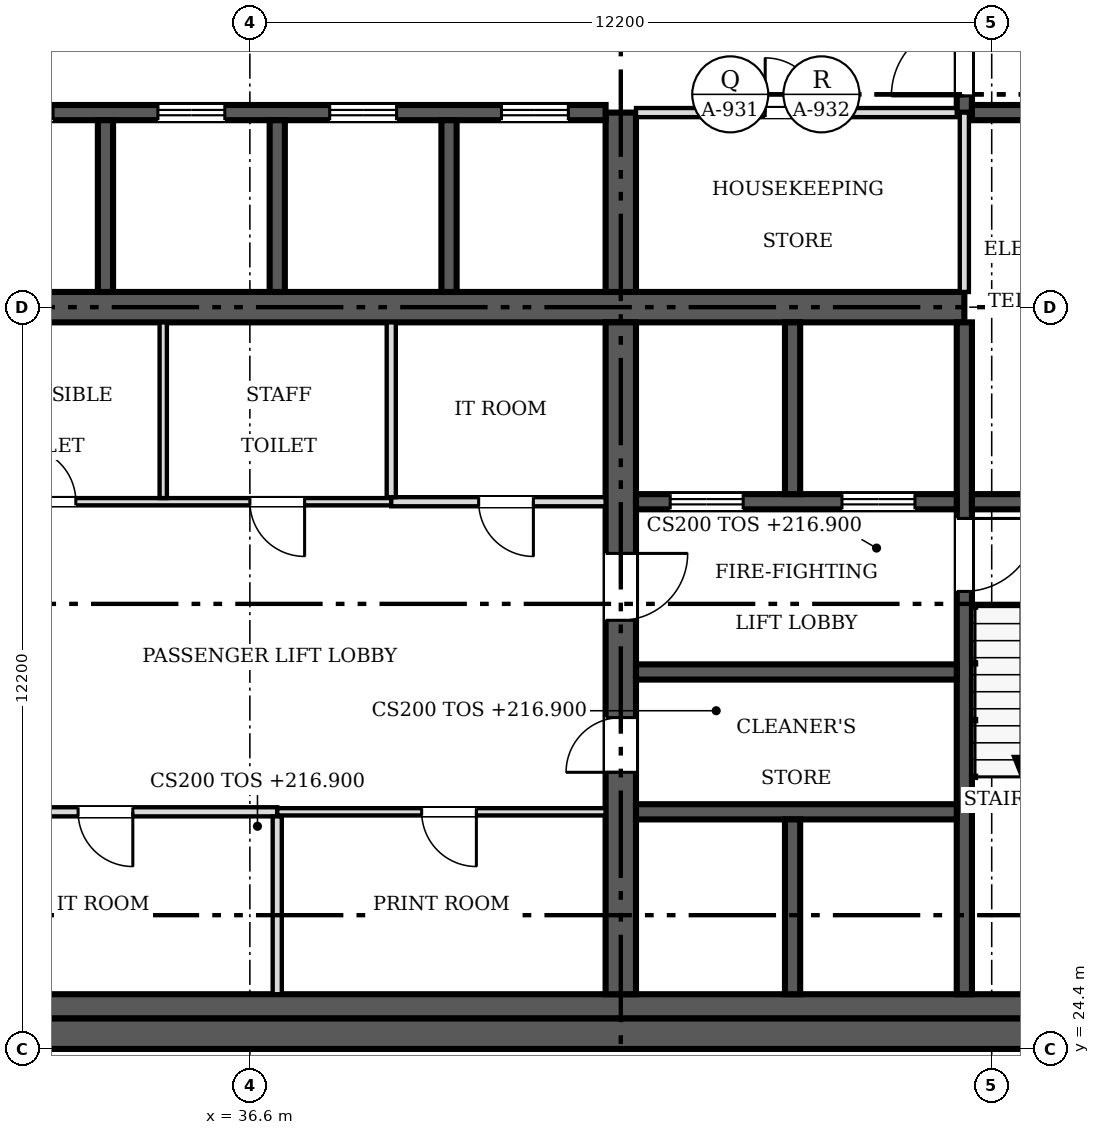
"""IFC4 building model, lengths in metres.
Left out: names, types, materials, properties, quantities, classifications, styles, units other than length and angle.
Written with IfcOpenShell. Run it as: python <this file> out.ifc"""

import sys

from ifc_helpers import new_model, si_unit, direction, frame, frame_2d, origin, place, context, subcontext, project, spatial, rectangle, extrude, source, transform, mapped, element, fill, save


model = new_model("IFC4")
c1 = context("Model", 3, precision=1e-05, world=origin(), true_north=direction((0.0, 1.0)))
c2 = subcontext(c1, "Body", "Model", "MODEL_VIEW")
j1 = project(units=[si_unit("LENGTHUNIT", "METRE"), si_unit("PLANEANGLEUNIT", "RADIAN")], contexts=[c1])
p1 = place(None, origin())
s1 = spatial("IfcSite", under=j1, at=p1, CompositionType="ELEMENT")
p2 = place(p1, origin())
s2 = spatial("IfcBuilding", under=s1, at=p2, CompositionType="ELEMENT")
p3 = place(p2, frame((0.0, 0.0, 216.9)))
s3 = spatial("IfcBuildingStorey", under=s2, at=p3, CompositionType="ELEMENT", Elevation=216.9)
p4 = place(p3, frame((54.9, 24.65, 0.0), z_axis=(0.0, 0.0, 1.0), x_axis=(-1.0, 0.0, 0.0)))
e1 = element("IfcWall", 1, at=p4, inside=s3, PredefinedType="SHEAR", context=c2, shape_type="SweptSolid", body=[
    extrude(rectangle(XDim=24.4, YDim=0.5, at=frame_2d((12.2, 0.0))), origin(), (0.0, 0.0, 1.0), 3.8),
])
m1 = source(origin(), c2, "Body", "SweptSolid", [
    extrude(rectangle(XDim=1.2, YDim=2.1, at=frame_2d((0.6, 1.05))), frame((0.0, 0.26, 0.0), z_axis=(0.0, -1.0, 0.0), x_axis=(1.0, 0.0, 0.0)), (0.0, 0.0, 1.0), 0.52),
])
p5 = place(p4, frame((1.5, 0.0, 0.0)))
e2 = element("IfcOpeningElement", 2, at=p5, cuts=e1, PredefinedType="OPENING", context=c2, shape_type="MappedRepresentation", body=[
    mapped(m1, transform((0.0, 0.0, 0.0), scale=1.0)),
])
p6 = place(p3, frame((31.0, 25.1, 0.0), z_axis=(0.0, 0.0, 1.0), x_axis=(1.0, 0.0, 0.0)))
e3 = element("IfcWall", 3, at=p6, inside=s3, PredefinedType="SOLIDWALL", context=c2, shape_type="SweptSolid", body=[
    extrude(rectangle(XDim=21.2, YDim=0.4, at=frame_2d((10.6, 0.0))), origin(), (0.0, 0.0, 1.0), 3.8),
])
p7 = place(p3, frame((31.4, 36.6, 0.0), z_axis=(0.0, 0.0, 1.0), x_axis=(1.0, 0.0, 0.0)))
e4 = element("IfcWall", 4, at=p7, inside=s3, PredefinedType="SHEAR", context=c2, shape_type="SweptSolid", body=[
    extrude(rectangle(XDim=16.95, YDim=0.5, at=frame_2d((8.475, 0.0))), origin(), (0.0, 0.0, 1.0), 3.8),
])
p8 = place(p3, frame((42.7, 36.35, 0.0), z_axis=(0.0, 0.0, 1.0), x_axis=(0.0, -1.0, 0.0)))
e5 = element("IfcWall", 5, at=p8, inside=s3, PredefinedType="SHEAR", context=c2, shape_type="SweptSolid", body=[
    extrude(rectangle(XDim=11.05, YDim=0.5, at=frame_2d((5.525, 0.0))), origin(), (0.0, 0.0, 1.0), 3.8),
])
m2 = source(origin(), c2, "Body", "SweptSolid", [
    extrude(rectangle(XDim=0.9, YDim=2.1, at=frame_2d((0.45, 1.05))), frame((0.0, 0.26, 0.0), z_axis=(0.0, -1.0, 0.0), x_axis=(1.0, 0.0, 0.0)), (0.0, 0.0, 1.0), 0.52),
])
p9 = place(p8, frame((6.5, 0.0, 0.0)))
e6 = element("IfcOpeningElement", 6, at=p9, cuts=e5, PredefinedType="OPENING", context=c2, shape_type="MappedRepresentation", body=[
    mapped(m2, transform((0.0, 0.0, 0.0), scale=1.0)),
])
m3 = source(origin(), c2, "Body", "SweptSolid", [
    extrude(rectangle(XDim=1.1, YDim=2.1, at=frame_2d((0.55, 1.05))), frame((0.0, 0.26, 0.0), z_axis=(0.0, -1.0, 0.0), x_axis=(1.0, 0.0, 0.0)), (0.0, 0.0, 1.0), 0.52),
])
p10 = place(p8, frame((3.8, 0.0, 0.0)))
e7 = element("IfcOpeningElement", 7, at=p10, cuts=e5, PredefinedType="OPENING", context=c2, shape_type="MappedRepresentation", body=[
    mapped(m3, transform((0.0, 0.0, 0.0), scale=1.0)),
])
p11 = place(p3, frame((42.7, 36.85, 0.0), z_axis=(0.0, 0.0, 1.0), x_axis=(0.0, 1.0, 0.0)))
e8 = element("IfcWall", 8, at=p11, inside=s3, PredefinedType="SHEAR", context=c2, shape_type="SweptSolid", body=[
    extrude(rectangle(XDim=2.95, YDim=0.5, at=frame_2d((1.475, 0.0))), origin(), (0.0, 0.0, 1.0), 3.8),
])
p12 = place(p3, frame((31.4, 39.8, 0.0), z_axis=(0.0, 0.0, 1.0), x_axis=(1.0, 0.0, 0.0)))
e9 = element("IfcWall", 9, at=p12, inside=s3, PredefinedType="SOLIDWALL", context=c2, shape_type="SweptSolid", body=[
    extrude(rectangle(XDim=11.05, YDim=0.25, at=frame_2d((5.525, 0.0))), origin(), (0.0, 0.0, 1.0), 3.8),
])
m4 = source(origin(), c2, "Body", "SweptSolid", [
    extrude(rectangle(XDim=1.1, YDim=2.1, at=frame_2d((0.55, 1.05))), frame((0.0, 0.135, 0.0), z_axis=(0.0, -1.0, 0.0), x_axis=(1.0, 0.0, 0.0)), (0.0, 0.0, 1.0), 0.27),
])
p13 = place(p12, frame((0.863, 0.0, 0.0)))
e10 = element("IfcOpeningElement", 10, at=p13, cuts=e9, PredefinedType="OPENING", context=c2, shape_type="MappedRepresentation", body=[
    mapped(m4, transform((0.0, 0.0, 0.0), scale=1.0)),
])
p14 = place(p12, frame((3.688, 0.0, 0.0)))
e11 = element("IfcOpeningElement", 11, at=p14, cuts=e9, PredefinedType="OPENING", context=c2, shape_type="MappedRepresentation", body=[
    mapped(m4, transform((0.0, 0.0, 0.0), scale=1.0)),
])
p15 = place(p12, frame((6.512, 0.0, 0.0)))
e12 = element("IfcOpeningElement", 12, at=p15, cuts=e9, PredefinedType="OPENING", context=c2, shape_type="MappedRepresentation", body=[
    mapped(m4, transform((0.0, 0.0, 0.0), scale=1.0)),
])
p16 = place(p12, frame((9.337, 0.0, 0.0)))
e13 = element("IfcOpeningElement", 13, at=p16, cuts=e9, PredefinedType="OPENING", context=c2, shape_type="MappedRepresentation", body=[
    mapped(m4, transform((0.0, 0.0, 0.0), scale=1.0)),
])
p17 = place(p3, frame((48.35, 36.35, 0.0), z_axis=(0.0, 0.0, 1.0), x_axis=(0.0, -1.0, 0.0)))
e14 = element("IfcWall", 14, at=p17, inside=s3, PredefinedType="SOLIDWALL", context=c2, shape_type="SweptSolid", body=[
    extrude(rectangle(XDim=11.05, YDim=0.25, at=frame_2d((5.525, 0.0))), origin(), (0.0, 0.0, 1.0), 3.8),
])
m5 = source(origin(), c2, "Body", "SweptSolid", [
    extrude(rectangle(XDim=1.2, YDim=2.1, at=frame_2d((0.6, 1.05))), frame((0.0, 0.135, 0.0), z_axis=(0.0, -1.0, 0.0), x_axis=(1.0, 0.0, 0.0)), (0.0, 0.0, 1.0), 0.27),
])
p18 = place(p17, frame((3.225, 0.0, 0.0)))
e15 = element("IfcOpeningElement", 15, at=p18, cuts=e14, PredefinedType="OPENING", context=c2, shape_type="MappedRepresentation", body=[
    mapped(m5, transform((0.0, 0.0, 0.0), scale=1.0)),
])
p19 = place(p3, frame((48.225, 33.4, 0.0), z_axis=(0.0, 0.0, 1.0), x_axis=(-1.0, 0.0, 0.0)))
e16 = element("IfcWall", 16, at=p19, inside=s3, PredefinedType="SOLIDWALL", context=c2, shape_type="SweptSolid", body=[
    extrude(rectangle(XDim=5.275, YDim=0.25, at=frame_2d((2.638, 0.0))), origin(), (0.0, 0.0, 1.0), 3.8),
])
p20 = place(p19, frame((3.512, 0.0, 0.0)))
e17 = element("IfcOpeningElement", 17, at=p20, cuts=e16, PredefinedType="OPENING", context=c2, shape_type="MappedRepresentation", body=[
    mapped(m5, transform((0.0, 0.0, 0.0), scale=1.0)),
])
p21 = place(p19, frame((0.688, 0.0, 0.0)))
e18 = element("IfcOpeningElement", 18, at=p21, cuts=e16, PredefinedType="OPENING", context=c2, shape_type="MappedRepresentation", body=[
    mapped(m5, transform((0.0, 0.0, 0.0), scale=1.0)),
])
p22 = place(p3, frame((48.475, 33.4, 0.0), z_axis=(0.0, 0.0, 1.0), x_axis=(1.0, 0.0, 0.0)))
e19 = element("IfcWall", 19, at=p22, inside=s3, PredefinedType="SOLIDWALL", context=c2, shape_type="SweptSolid", body=[
    extrude(rectangle(XDim=3.525, YDim=0.25, at=frame_2d((1.762, 0.0))), origin(), (0.0, 0.0, 1.0), 3.8),
])
p23 = place(p3, frame((48.35, 47.9, 0.0), z_axis=(0.0, 0.0, 1.0), x_axis=(0.0, -1.0, 0.0)))
e20 = element("IfcWall", 20, at=p23, inside=s3, PredefinedType="SOLIDWALL", context=c2, shape_type="SweptSolid", body=[
    extrude(rectangle(XDim=8.1, YDim=0.25, at=frame_2d((4.05, 0.0))), origin(), (0.0, 0.0, 1.0), 3.8),
])
p24 = place(p23, frame((6.625, 0.0, 0.0)))
e21 = element("IfcOpeningElement", 21, at=p24, cuts=e20, PredefinedType="OPENING", context=c2, shape_type="MappedRepresentation", body=[
    mapped(m5, transform((0.0, 0.0, 0.0), scale=1.0)),
])
for number, where, z_axis, x_axis in (
    (22, (42.95, 28.3, 0.0), (0.0, 0.0, 1.0), (1.0, 0.0, 0.0)),
    (23, (42.95, 30.6, 0.0), (0.0, 0.0, 1.0), (1.0, 0.0, 0.0)),
):
    element("IfcWall", number, at=place(p3, frame(where, z_axis=z_axis, x_axis=x_axis)), inside=s3, PredefinedType="SOLIDWALL", context=c2, shape_type="SweptSolid", body=[
        extrude(rectangle(XDim=5.275, YDim=0.25, at=frame_2d((2.638, 0.0))), origin(), (0.0, 0.0, 1.0), 3.8),
    ])
p25 = place(p3, frame((48.475, 39.8, 0.0), z_axis=(0.0, 0.0, 1.0), x_axis=(1.0, 0.0, 0.0)))
e24 = element("IfcWall", 24, at=p25, inside=s3, PredefinedType="SOLIDWALL", context=c2, shape_type="SweptSolid", body=[
    extrude(rectangle(XDim=3.4, YDim=0.25, at=frame_2d((1.7, 0.0))), origin(), (0.0, 0.0, 1.0), 3.8),
])
for number, where, z_axis, x_axis in (
    (25, (34.225, 36.85, 0.0), (0.0, 0.0, 1.0), (0.0, 1.0, 0.0)),
    (26, (37.05, 36.85, 0.0), (0.0, 0.0, 1.0), (0.0, 1.0, 0.0)),
    (27, (39.875, 36.85, 0.0), (0.0, 0.0, 1.0), (0.0, 1.0, 0.0)),
):
    element("IfcWall", number, at=place(p3, frame(where, z_axis=z_axis, x_axis=x_axis)), inside=s3, PredefinedType="SOLIDWALL", context=c2, shape_type="SweptSolid", body=[
        extrude(rectangle(XDim=2.825, YDim=0.25, at=frame_2d((1.413, 0.0))), origin(), (0.0, 0.0, 1.0), 3.8),
    ])
p26 = place(p3, frame((45.525, 33.525, 0.0), z_axis=(0.0, 0.0, 1.0), x_axis=(0.0, 1.0, 0.0)))
e28 = element("IfcWall", 28, at=p26, inside=s3, PredefinedType="SOLIDWALL", context=c2, shape_type="SweptSolid", body=[
    extrude(rectangle(XDim=2.825, YDim=0.25, at=frame_2d((1.413, 0.0))), origin(), (0.0, 0.0, 1.0), 3.8),
])
p27 = place(p3, frame((45.525, 25.3, 0.0), z_axis=(0.0, 0.0, 1.0), x_axis=(0.0, 1.0, 0.0)))
e29 = element("IfcWall", 29, at=p27, inside=s3, PredefinedType="SOLIDWALL", context=c2, shape_type="SweptSolid", body=[
    extrude(rectangle(XDim=2.875, YDim=0.25, at=frame_2d((1.438, 0.0))), origin(), (0.0, 0.0, 1.0), 3.8),
])
p28 = place(p3, frame((31.4, 33.4, 0.0), z_axis=(0.0, 0.0, 1.0), x_axis=(1.0, 0.0, 0.0)))
e30 = element("IfcWall", 30, at=p28, inside=s3, PredefinedType="PARTITIONING", context=c2, shape_type="SweptSolid", body=[
    extrude(rectangle(XDim=7.525, YDim=0.12, at=frame_2d((3.763, 0.0))), origin(), (0.0, 0.0, 1.0), 3.6),
])
m6 = source(origin(), c2, "Body", "SweptSolid", [
    extrude(rectangle(XDim=0.9, YDim=2.1, at=frame_2d((0.45, 1.05))), frame((0.0, 0.07, 0.0), z_axis=(0.0, -1.0, 0.0), x_axis=(1.0, 0.0, 0.0)), (0.0, 0.0, 1.0), 0.14),
])
p29 = place(p28, frame((1.438, 0.0, 0.0)))
e31 = element("IfcOpeningElement", 31, at=p29, cuts=e30, PredefinedType="OPENING", context=c2, shape_type="MappedRepresentation", body=[
    mapped(m6, transform((0.0, 0.0, 0.0), scale=1.0)),
])
p30 = place(p28, frame((5.2, 0.0, 0.0)))
e32 = element("IfcOpeningElement", 32, at=p30, cuts=e30, PredefinedType="OPENING", context=c2, shape_type="MappedRepresentation", body=[
    mapped(m6, transform((0.0, 0.0, 0.0), scale=1.0)),
])
p31 = place(p3, frame((48.225, 39.8, 0.0), z_axis=(0.0, 0.0, 1.0), x_axis=(-1.0, 0.0, 0.0)))
e33 = element("IfcWall", 33, at=p31, inside=s3, PredefinedType="PARTITIONING", context=c2, shape_type="SweptSolid", body=[
    extrude(rectangle(XDim=5.275, YDim=0.15, at=frame_2d((2.638, 0.0))), origin(), (0.0, 0.0, 1.0), 3.6),
])
m7 = source(origin(), c2, "Body", "SweptSolid", [
    extrude(rectangle(XDim=0.9, YDim=2.1, at=frame_2d((0.45, 1.05))), frame((0.0, 0.085, 0.0), z_axis=(0.0, -1.0, 0.0), x_axis=(1.0, 0.0, 0.0)), (0.0, 0.0, 1.0), 0.17),
])
p32 = place(p31, frame((2.25, 0.0, 0.0)))
e34 = element("IfcOpeningElement", 34, at=p32, cuts=e33, PredefinedType="OPENING", context=c2, shape_type="MappedRepresentation", body=[
    mapped(m7, transform((0.0, 0.0, 0.0), scale=1.0)),
])
p33 = place(p3, frame((37.05, 28.3, 0.0), z_axis=(0.0, 0.0, 1.0), x_axis=(-1.0, 0.0, 0.0)))
e35 = element("IfcWall", 35, at=p33, inside=s3, PredefinedType="PARTITIONING", context=c2, shape_type="SweptSolid", body=[
    extrude(rectangle(XDim=5.65, YDim=0.15, at=frame_2d((2.825, 0.0))), origin(), (0.0, 0.0, 1.0), 3.6),
])
p34 = place(p33, frame((2.375, 0.0, 0.0)))
e36 = element("IfcOpeningElement", 36, at=p34, cuts=e35, PredefinedType="OPENING", context=c2, shape_type="MappedRepresentation", body=[
    mapped(m7, transform((0.0, 0.0, 0.0), scale=1.0)),
])
p35 = place(p3, frame((42.45, 28.3, 0.0), z_axis=(0.0, 0.0, 1.0), x_axis=(-1.0, 0.0, 0.0)))
e37 = element("IfcWall", 37, at=p35, inside=s3, PredefinedType="PARTITIONING", context=c2, shape_type="SweptSolid", body=[
    extrude(rectangle(XDim=5.4, YDim=0.12, at=frame_2d((2.7, 0.0))), origin(), (0.0, 0.0, 1.0), 3.6),
])
p36 = place(p35, frame((2.125, 0.0, 0.0)))
e38 = element("IfcOpeningElement", 38, at=p36, cuts=e37, PredefinedType="OPENING", context=c2, shape_type="MappedRepresentation", body=[
    mapped(m6, transform((0.0, 0.0, 0.0), scale=1.0)),
])
p37 = place(p3, frame((38.925, 33.4, 0.0), z_axis=(0.0, 0.0, 1.0), x_axis=(1.0, 0.0, 0.0)))
e39 = element("IfcWall", 39, at=p37, inside=s3, PredefinedType="PARTITIONING", context=c2, shape_type="SweptSolid", body=[
    extrude(rectangle(XDim=3.525, YDim=0.15, at=frame_2d((1.762, 0.0))), origin(), (0.0, 0.0, 1.0), 3.6),
])
p38 = place(p37, frame((1.438, 0.0, 0.0)))
e40 = element("IfcOpeningElement", 40, at=p38, cuts=e39, PredefinedType="OPENING", context=c2, shape_type="MappedRepresentation", body=[
    mapped(m7, transform((0.0, 0.0, 0.0), scale=1.0)),
])
p39 = place(p3, frame((48.35, 36.85, 0.0), z_axis=(0.0, 0.0, 1.0), x_axis=(0.0, 1.0, 0.0)))
e41 = element("IfcWall", 41, at=p39, inside=s3, PredefinedType="PARTITIONING", context=c2, shape_type="SweptSolid", body=[
    extrude(rectangle(XDim=2.95, YDim=0.15, at=frame_2d((1.475, 0.0))), origin(), (0.0, 0.0, 1.0), 3.6),
])
p40 = place(p3, frame((35.175, 33.46, 0.0), z_axis=(0.0, 0.0, 1.0), x_axis=(0.0, 1.0, 0.0)))
e42 = element("IfcWall", 42, at=p40, inside=s3, PredefinedType="PARTITIONING", context=c2, shape_type="SweptSolid", body=[
    extrude(rectangle(XDim=2.89, YDim=0.12, at=frame_2d((1.445, 0.0))), origin(), (0.0, 0.0, 1.0), 3.6),
])
p41 = place(p3, frame((38.925, 33.475, 0.0), z_axis=(0.0, 0.0, 1.0), x_axis=(0.0, 1.0, 0.0)))
e43 = element("IfcWall", 43, at=p41, inside=s3, PredefinedType="PARTITIONING", context=c2, shape_type="SweptSolid", body=[
    extrude(rectangle(XDim=2.875, YDim=0.15, at=frame_2d((1.438, 0.0))), origin(), (0.0, 0.0, 1.0), 3.6),
])
p42 = place(p3, frame((37.05, 25.3, 0.0), z_axis=(0.0, 0.0, 1.0), x_axis=(0.0, 1.0, 0.0)))
e44 = element("IfcWall", 44, at=p42, inside=s3, PredefinedType="PARTITIONING", context=c2, shape_type="SweptSolid", body=[
    extrude(rectangle(XDim=2.925, YDim=0.15, at=frame_2d((1.462, 0.0))), origin(), (0.0, 0.0, 1.0), 3.6),
])
m8 = source(origin(), c2, "Body", "SweptSolid", [
    extrude(rectangle(XDim=0.9, YDim=2.1, at=frame_2d((0.45, 1.05))), frame((0.0, 0.025, 0.0), z_axis=(0.0, -1.0, 0.0), x_axis=(1.0, 0.0, 0.0)), (0.0, 0.0, 1.0), 0.05),
])
p43 = place(p9, origin())
e45 = element("IfcDoor", 45, at=p43, inside=s3, OperationType="SINGLE_SWING_RIGHT", PredefinedType="DOOR", context=c2, shape_type="MappedRepresentation", body=[
    mapped(m8, transform((0.0, 0.0, 0.0), scale=1.0)),
])
fill(e6, e45)
m9 = source(origin(), c2, "Body", "SweptSolid", [
    extrude(rectangle(XDim=1.1, YDim=2.1, at=frame_2d((0.55, 1.05))), frame((0.0, 0.025, 0.0), z_axis=(0.0, -1.0, 0.0), x_axis=(1.0, 0.0, 0.0)), (0.0, 0.0, 1.0), 0.05),
])
p44 = place(p10, origin())
e46 = element("IfcDoor", 46, at=p44, inside=s3, OperationType="SINGLE_SWING_LEFT", PredefinedType="DOOR", context=c2, shape_type="MappedRepresentation", body=[
    mapped(m9, transform((0.0, 0.0, 0.0), scale=1.0)),
])
fill(e7, e46)
p45 = place(p13, origin())
e47 = element("IfcDoor", 47, at=p45, inside=s3, OperationType="DOUBLE_DOOR_SLIDING", PredefinedType="DOOR", context=c2, shape_type="MappedRepresentation", body=[
    mapped(m9, transform((0.0, 0.0, 0.0), scale=1.0)),
])
fill(e10, e47)
p46 = place(p14, origin())
e48 = element("IfcDoor", 48, at=p46, inside=s3, OperationType="DOUBLE_DOOR_SLIDING", PredefinedType="DOOR", context=c2, shape_type="MappedRepresentation", body=[
    mapped(m9, transform((0.0, 0.0, 0.0), scale=1.0)),
])
fill(e11, e48)
p47 = place(p15, origin())
e49 = element("IfcDoor", 49, at=p47, inside=s3, OperationType="DOUBLE_DOOR_SLIDING", PredefinedType="DOOR", context=c2, shape_type="MappedRepresentation", body=[
    mapped(m9, transform((0.0, 0.0, 0.0), scale=1.0)),
])
fill(e12, e49)
p48 = place(p16, origin())
e50 = element("IfcDoor", 50, at=p48, inside=s3, OperationType="DOUBLE_DOOR_SLIDING", PredefinedType="DOOR", context=c2, shape_type="MappedRepresentation", body=[
    mapped(m9, transform((0.0, 0.0, 0.0), scale=1.0)),
])
fill(e13, e50)
m10 = source(origin(), c2, "Body", "SweptSolid", [
    extrude(rectangle(XDim=1.2, YDim=2.1, at=frame_2d((0.6, 1.05))), frame((0.0, 0.025, 0.0), z_axis=(0.0, -1.0, 0.0), x_axis=(1.0, 0.0, 0.0)), (0.0, 0.0, 1.0), 0.05),
])
p49 = place(p18, origin())
e51 = element("IfcDoor", 51, at=p49, inside=s3, OperationType="SINGLE_SWING_LEFT", PredefinedType="DOOR", context=c2, shape_type="MappedRepresentation", body=[
    mapped(m10, transform((0.0, 0.0, 0.0), scale=1.0)),
])
fill(e15, e51)
p50 = place(p20, origin())
e52 = element("IfcDoor", 52, at=p50, inside=s3, OperationType="DOUBLE_DOOR_SLIDING", PredefinedType="DOOR", context=c2, shape_type="MappedRepresentation", body=[
    mapped(m10, transform((0.0, 0.0, 0.0), scale=1.0)),
])
fill(e17, e52)
p51 = place(p21, origin())
e53 = element("IfcDoor", 53, at=p51, inside=s3, OperationType="DOUBLE_DOOR_SLIDING", PredefinedType="DOOR", context=c2, shape_type="MappedRepresentation", body=[
    mapped(m10, transform((0.0, 0.0, 0.0), scale=1.0)),
])
fill(e18, e53)
p52 = place(p24, origin())
e54 = element("IfcDoor", 54, at=p52, inside=s3, OperationType="SINGLE_SWING_RIGHT", PredefinedType="DOOR", context=c2, shape_type="MappedRepresentation", body=[
    mapped(m10, transform((0.0, 0.0, 0.0), scale=1.0)),
])
fill(e21, e54)
p53 = place(p29, origin())
e55 = element("IfcDoor", 55, at=p53, inside=s3, OperationType="SINGLE_SWING_LEFT", PredefinedType="DOOR", context=c2, shape_type="MappedRepresentation", body=[
    mapped(m8, transform((0.0, 0.0, 0.0), scale=1.0)),
])
fill(e31, e55)
p54 = place(p30, origin())
e56 = element("IfcDoor", 56, at=p54, inside=s3, OperationType="SINGLE_SWING_RIGHT", PredefinedType="DOOR", context=c2, shape_type="MappedRepresentation", body=[
    mapped(m8, transform((0.0, 0.0, 0.0), scale=1.0)),
])
fill(e32, e56)
p55 = place(p32, origin())
e57 = element("IfcDoor", 57, at=p55, inside=s3, OperationType="SINGLE_SWING_RIGHT", PredefinedType="DOOR", context=c2, shape_type="MappedRepresentation", body=[
    mapped(m8, transform((0.0, 0.0, 0.0), scale=1.0)),
])
fill(e34, e57)
p56 = place(p34, origin())
e58 = element("IfcDoor", 58, at=p56, inside=s3, OperationType="SINGLE_SWING_LEFT", PredefinedType="DOOR", context=c2, shape_type="MappedRepresentation", body=[
    mapped(m8, transform((0.0, 0.0, 0.0), scale=1.0)),
])
fill(e36, e58)
p57 = place(p36, origin())
e59 = element("IfcDoor", 59, at=p57, inside=s3, OperationType="SINGLE_SWING_LEFT", PredefinedType="DOOR", context=c2, shape_type="MappedRepresentation", body=[
    mapped(m8, transform((0.0, 0.0, 0.0), scale=1.0)),
])
fill(e38, e59)
p58 = place(p38, origin())
e60 = element("IfcDoor", 60, at=p58, inside=s3, OperationType="SINGLE_SWING_RIGHT", PredefinedType="DOOR", context=c2, shape_type="MappedRepresentation", body=[
    mapped(m8, transform((0.0, 0.0, 0.0), scale=1.0)),
])
fill(e40, e60)
save(model, sys.argv[1])
